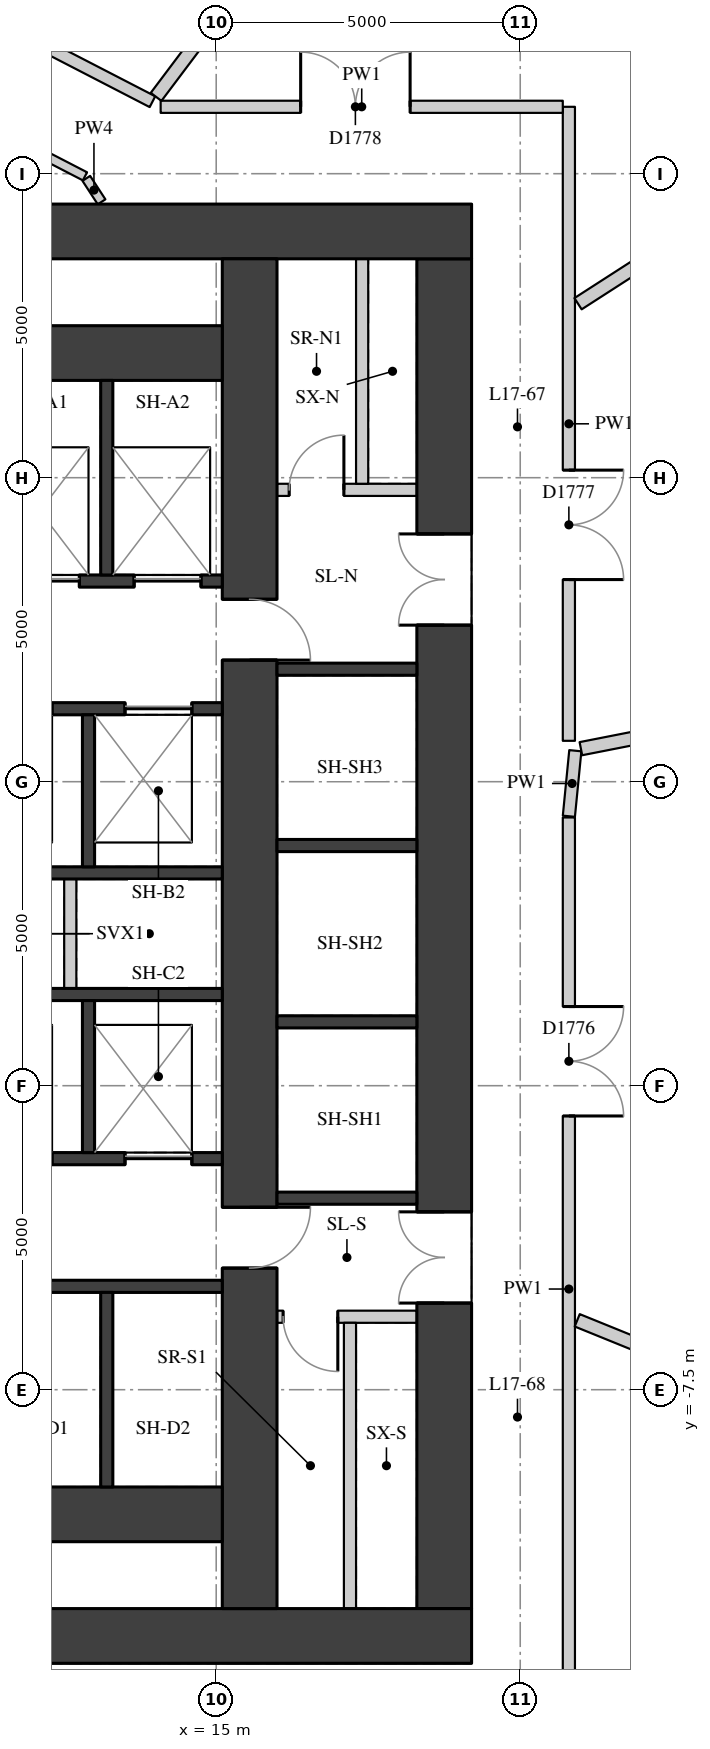
"""IFC4 building model, lengths in metres.
Left out: names, types, materials, properties, quantities, classifications, styles, units other than length and angle.
Written with IfcOpenShell. Run it as: python <this file> out.ifc"""

import sys

from ifc_helpers import new_model, si_unit, direction, frame, frame_2d, origin, place, context, subcontext, project, spatial, rectangle, extrude, element, fill, save


model = new_model("IFC4")
c1 = context("Model", 3, precision=1e-05, world=origin(), true_north=direction((0.0, 1.0)))
c2 = subcontext(c1, "Body", "Model", "MODEL_VIEW")
j1 = project(units=[si_unit("LENGTHUNIT", "METRE"), si_unit("PLANEANGLEUNIT", "RADIAN")], contexts=[c1])
p1 = place(None, origin())
s1 = spatial("IfcSite", under=j1, at=p1, CompositionType="ELEMENT")
p2 = place(p1, origin())
s2 = spatial("IfcBuilding", under=s1, at=p2, CompositionType="ELEMENT")
p3 = place(p2, frame((0.0, 0.0, 64.6)))
s3 = spatial("IfcBuildingStorey", under=s2, at=p3, CompositionType="ELEMENT", Elevation=64.6)
p4 = place(p3, frame((18.75, -11.1, 0.0), z_axis=(0.0, 0.0, 1.0), x_axis=(0.0, 1.0, 0.0)))
e1 = element("IfcWall", 1, at=p4, inside=s3, PredefinedType="SHEAR", context=c2, shape_type="SweptSolid", body=[
    extrude(rectangle(XDim=22.2, YDim=0.9, at=frame_2d((11.1, 0.0))), origin(), (0.0, 0.0, 1.0), 3.02),
])
p5 = place(p4, frame((16.175, 0.0, 0.0)))
e2 = element("IfcOpeningElement", 2, at=p5, cuts=e1, PredefinedType="OPENING", context=c2, shape_type="SweptSolid", body=[
    extrude(rectangle(XDim=1.5, YDim=2.1, at=frame_2d((0.75, 1.05))), frame((0.0, 0.46, 0.0), z_axis=(0.0, -1.0, 0.0), x_axis=(1.0, 0.0, 0.0)), (0.0, 0.0, 1.0), 0.92),
])
p6 = place(p4, frame((5.025, 0.0, 0.0)))
e3 = element("IfcOpeningElement", 3, at=p6, cuts=e1, PredefinedType="OPENING", context=c2, shape_type="SweptSolid", body=[
    extrude(rectangle(XDim=1.5, YDim=2.1, at=frame_2d((0.75, 1.05))), frame((0.0, 0.46, 0.0), z_axis=(0.0, -1.0, 0.0), x_axis=(1.0, 0.0, 0.0)), (0.0, 0.0, 1.0), 0.92),
])
for number, where, z_axis, x_axis in (
    (4, (4.0, 11.55, 0.0), (0.0, 0.0, 1.0), (1.0, 0.0, 0.0)),
    (5, (4.0, -11.55, 0.0), (0.0, 0.0, 1.0), (1.0, 0.0, 0.0)),
):
    element("IfcWall", number, at=place(p3, frame(where, z_axis=z_axis, x_axis=x_axis)), inside=s3, PredefinedType="SHEAR", context=c2, shape_type="SweptSolid", body=[
        extrude(rectangle(XDim=15.2, YDim=0.9, at=frame_2d((7.6, 0.0))), origin(), (0.0, 0.0, 1.0), 3.02),
    ])
p7 = place(p3, frame((15.55, -11.1, 0.0), z_axis=(0.0, 0.0, 1.0), x_axis=(0.0, 1.0, 0.0)))
e6 = element("IfcWall", 6, at=p7, inside=s3, PredefinedType="SHEAR", context=c2, shape_type="SweptSolid", body=[
    extrude(rectangle(XDim=22.2, YDim=0.9, at=frame_2d((11.1, 0.0))), origin(), (0.0, 0.0, 1.0), 3.02),
])
p8 = place(p7, frame((15.6, 0.0, 0.0)))
e7 = element("IfcOpeningElement", 7, at=p8, cuts=e6, PredefinedType="OPENING", context=c2, shape_type="SweptSolid", body=[
    extrude(rectangle(XDim=1.0, YDim=2.1, at=frame_2d((0.5, 1.05))), frame((0.0, 0.46, 0.0), z_axis=(0.0, -1.0, 0.0), x_axis=(1.0, 0.0, 0.0)), (0.0, 0.0, 1.0), 0.92),
])
p9 = place(p7, frame((5.6, 0.0, 0.0)))
e8 = element("IfcOpeningElement", 8, at=p9, cuts=e6, PredefinedType="OPENING", context=c2, shape_type="SweptSolid", body=[
    extrude(rectangle(XDim=1.0, YDim=2.1, at=frame_2d((0.5, 1.05))), frame((0.0, 0.46, 0.0), z_axis=(0.0, -1.0, 0.0), x_axis=(1.0, 0.0, 0.0)), (0.0, 0.0, 1.0), 0.92),
])
for number, where, z_axis, x_axis in (
    (9, (4.9, 9.55, 0.0), (0.0, 0.0, 1.0), (1.0, 0.0, 0.0)),
    (10, (4.9, -9.55, 0.0), (0.0, 0.0, 1.0), (1.0, 0.0, 0.0)),
):
    element("IfcWall", number, at=place(p3, frame(where, z_axis=z_axis, x_axis=x_axis)), inside=s3, PredefinedType="SHEAR", context=c2, shape_type="SweptSolid", body=[
        extrude(rectangle(XDim=10.2, YDim=0.9, at=frame_2d((5.1, 0.0))), origin(), (0.0, 0.0, 1.0), 3.02),
    ])
p10 = place(p3, frame((4.9, 5.8, 0.0), z_axis=(0.0, 0.0, 1.0), x_axis=(1.0, 0.0, 0.0)))
e11 = element("IfcWall", 11, at=p10, inside=s3, PredefinedType="SHEAR", context=c2, shape_type="SweptSolid", body=[
    extrude(rectangle(XDim=10.2, YDim=0.2, at=frame_2d((5.1, 0.0))), origin(), (0.0, 0.0, 1.0), 3.02),
])
p11 = place(p10, frame((6.75, 0.0, 0.0)))
e12 = element("IfcOpeningElement", 12, at=p11, cuts=e11, PredefinedType="OPENING", context=c2, shape_type="SweptSolid", body=[
    extrude(rectangle(XDim=1.1, YDim=2.1, at=frame_2d((0.55, 1.05))), frame((0.0, 0.11, 0.0), z_axis=(0.0, -1.0, 0.0), x_axis=(1.0, 0.0, 0.0)), (0.0, 0.0, 1.0), 0.22),
])
p12 = place(p10, frame((8.75, 0.0, 0.0)))
e13 = element("IfcOpeningElement", 13, at=p12, cuts=e11, PredefinedType="OPENING", context=c2, shape_type="SweptSolid", body=[
    extrude(rectangle(XDim=1.1, YDim=2.1, at=frame_2d((0.55, 1.05))), frame((0.0, 0.11, 0.0), z_axis=(0.0, -1.0, 0.0), x_axis=(1.0, 0.0, 0.0)), (0.0, 0.0, 1.0), 0.22),
])
p13 = place(p3, frame((4.9, 3.7, 0.0), z_axis=(0.0, 0.0, 1.0), x_axis=(1.0, 0.0, 0.0)))
e14 = element("IfcWall", 14, at=p13, inside=s3, PredefinedType="SHEAR", context=c2, shape_type="SweptSolid", body=[
    extrude(rectangle(XDim=10.2, YDim=0.2, at=frame_2d((5.1, 0.0))), origin(), (0.0, 0.0, 1.0), 3.02),
])
p14 = place(p13, frame((6.3, 0.0, 0.0)))
e15 = element("IfcOpeningElement", 15, at=p14, cuts=e14, PredefinedType="OPENING", context=c2, shape_type="SweptSolid", body=[
    extrude(rectangle(XDim=1.1, YDim=2.1, at=frame_2d((0.55, 1.05))), frame((0.0, 0.11, 0.0), z_axis=(0.0, -1.0, 0.0), x_axis=(1.0, 0.0, 0.0)), (0.0, 0.0, 1.0), 0.22),
])
p15 = place(p13, frame((8.6, 0.0, 0.0)))
e16 = element("IfcOpeningElement", 16, at=p15, cuts=e14, PredefinedType="OPENING", context=c2, shape_type="SweptSolid", body=[
    extrude(rectangle(XDim=1.1, YDim=2.1, at=frame_2d((0.55, 1.05))), frame((0.0, 0.11, 0.0), z_axis=(0.0, -1.0, 0.0), x_axis=(1.0, 0.0, 0.0)), (0.0, 0.0, 1.0), 0.22),
])
for number, where, z_axis, x_axis in (
    (17, (4.9, 1.0, 0.0), (0.0, 0.0, 1.0), (1.0, 0.0, 0.0)),
    (18, (4.9, -1.0, 0.0), (0.0, 0.0, 1.0), (1.0, 0.0, 0.0)),
):
    element("IfcWall", number, at=place(p3, frame(where, z_axis=z_axis, x_axis=x_axis)), inside=s3, PredefinedType="SHEAR", context=c2, shape_type="SweptSolid", body=[
        extrude(rectangle(XDim=10.2, YDim=0.2, at=frame_2d((5.1, 0.0))), origin(), (0.0, 0.0, 1.0), 3.02),
    ])
p16 = place(p3, frame((4.9, -3.7, 0.0), z_axis=(0.0, 0.0, 1.0), x_axis=(1.0, 0.0, 0.0)))
e19 = element("IfcWall", 19, at=p16, inside=s3, PredefinedType="SHEAR", context=c2, shape_type="SweptSolid", body=[
    extrude(rectangle(XDim=10.2, YDim=0.2, at=frame_2d((5.1, 0.0))), origin(), (0.0, 0.0, 1.0), 3.02),
])
p17 = place(p16, frame((6.3, 0.0, 0.0)))
e20 = element("IfcOpeningElement", 20, at=p17, cuts=e19, PredefinedType="OPENING", context=c2, shape_type="SweptSolid", body=[
    extrude(rectangle(XDim=1.1, YDim=2.1, at=frame_2d((0.55, 1.05))), frame((0.0, 0.11, 0.0), z_axis=(0.0, -1.0, 0.0), x_axis=(1.0, 0.0, 0.0)), (0.0, 0.0, 1.0), 0.22),
])
p18 = place(p16, frame((8.6, 0.0, 0.0)))
e21 = element("IfcOpeningElement", 21, at=p18, cuts=e19, PredefinedType="OPENING", context=c2, shape_type="SweptSolid", body=[
    extrude(rectangle(XDim=1.1, YDim=2.1, at=frame_2d((0.55, 1.05))), frame((0.0, 0.11, 0.0), z_axis=(0.0, -1.0, 0.0), x_axis=(1.0, 0.0, 0.0)), (0.0, 0.0, 1.0), 0.22),
])
p19 = place(p3, frame((4.9, -5.8, 0.0), z_axis=(0.0, 0.0, 1.0), x_axis=(1.0, 0.0, 0.0)))
e22 = element("IfcWall", 22, at=p19, inside=s3, PredefinedType="SHEAR", context=c2, shape_type="SweptSolid", body=[
    extrude(rectangle(XDim=10.2, YDim=0.2, at=frame_2d((5.1, 0.0))), origin(), (0.0, 0.0, 1.0), 3.02),
])
for number, where, z_axis, x_axis in (
    (23, (13.2, 5.9, 0.0), (0.0, 0.0, 1.0), (0.0, 1.0, 0.0)),
    (24, (13.2, -9.1, 0.0), (0.0, 0.0, 1.0), (0.0, 1.0, 0.0)),
):
    element("IfcWall", number, at=place(p3, frame(where, z_axis=z_axis, x_axis=x_axis)), inside=s3, PredefinedType="SHEAR", context=c2, shape_type="SweptSolid", body=[
        extrude(rectangle(XDim=3.2, YDim=0.2, at=frame_2d((1.6, 0.0))), origin(), (0.0, 0.0, 1.0), 3.02),
    ])
for number, where, z_axis, x_axis in (
    (25, (12.9, 1.1, 0.0), (0.0, 0.0, 1.0), (0.0, 1.0, 0.0)),
    (26, (12.9, -3.6, 0.0), (0.0, 0.0, 1.0), (0.0, 1.0, 0.0)),
):
    element("IfcWall", number, at=place(p3, frame(where, z_axis=z_axis, x_axis=x_axis)), inside=s3, PredefinedType="SHEAR", context=c2, shape_type="SweptSolid", body=[
        extrude(rectangle(XDim=2.5, YDim=0.2, at=frame_2d((1.25, 0.0))), origin(), (0.0, 0.0, 1.0), 3.02),
    ])
p20 = place(p3, frame((12.6, -0.9, 0.0), z_axis=(0.0, 0.0, 1.0), x_axis=(0.0, 1.0, 0.0)))
e27 = element("IfcWall", 27, at=p20, inside=s3, PredefinedType="PARTITIONING", context=c2, shape_type="SweptSolid", body=[
    extrude(rectangle(XDim=1.8, YDim=0.2, at=frame_2d((0.9, 0.0))), origin(), (0.0, 0.0, 1.0), 3.02),
])
for number, where, z_axis, x_axis in (
    (28, (16.0, -4.35, 0.0), (0.0, 0.0, 1.0), (1.0, 0.0, 0.0)),
    (29, (16.0, -1.45, 0.0), (0.0, 0.0, 1.0), (1.0, 0.0, 0.0)),
    (30, (16.0, 1.45, 0.0), (0.0, 0.0, 1.0), (1.0, 0.0, 0.0)),
    (31, (16.0, 4.35, 0.0), (0.0, 0.0, 1.0), (1.0, 0.0, 0.0)),
):
    element("IfcWall", number, at=place(p3, frame(where, z_axis=z_axis, x_axis=x_axis)), inside=s3, PredefinedType="SHEAR", context=c2, shape_type="SweptSolid", body=[
        extrude(rectangle(XDim=2.3, YDim=0.2, at=frame_2d((1.15, 0.0))), origin(), (0.0, 0.0, 1.0), 3.02),
    ])
p21 = place(p3, frame((16.0, 7.3, 0.0), z_axis=(0.0, 0.0, 1.0), x_axis=(1.0, 0.0, 0.0)))
e32 = element("IfcWall", 32, at=p21, inside=s3, PredefinedType="PARTITIONING", context=c2, shape_type="SweptSolid", body=[
    extrude(rectangle(XDim=2.3, YDim=0.2, at=frame_2d((1.15, 0.0))), origin(), (0.0, 0.0, 1.0), 3.02),
])
p22 = place(p21, frame((0.2, 0.0, 0.0)))
e33 = element("IfcOpeningElement", 33, at=p22, cuts=e32, PredefinedType="OPENING", context=c2, shape_type="SweptSolid", body=[
    extrude(rectangle(XDim=0.9, YDim=2.1, at=frame_2d((0.45, 1.05))), frame((0.0, 0.11, 0.0), z_axis=(0.0, -1.0, 0.0), x_axis=(1.0, 0.0, 0.0)), (0.0, 0.0, 1.0), 0.22),
])
p23 = place(p3, frame((17.4, 7.4, 0.0), z_axis=(0.0, 0.0, 1.0), x_axis=(0.0, 1.0, 0.0)))
e34 = element("IfcWall", 34, at=p23, inside=s3, PredefinedType="PARTITIONING", context=c2, shape_type="SweptSolid", body=[
    extrude(rectangle(XDim=3.7, YDim=0.2, at=frame_2d((1.85, 0.0))), origin(), (0.0, 0.0, 1.0), 3.02),
])
p24 = place(p3, frame((16.0, -6.3, 0.0), z_axis=(0.0, 0.0, 1.0), x_axis=(1.0, 0.0, 0.0)))
e35 = element("IfcWall", 35, at=p24, inside=s3, PredefinedType="PARTITIONING", context=c2, shape_type="SweptSolid", body=[
    extrude(rectangle(XDim=2.3, YDim=0.2, at=frame_2d((1.15, 0.0))), origin(), (0.0, 0.0, 1.0), 3.02),
])
p25 = place(p24, frame((0.1, 0.0, 0.0)))
e36 = element("IfcOpeningElement", 36, at=p25, cuts=e35, PredefinedType="OPENING", context=c2, shape_type="SweptSolid", body=[
    extrude(rectangle(XDim=0.9, YDim=2.1, at=frame_2d((0.45, 1.05))), frame((0.0, 0.11, 0.0), z_axis=(0.0, -1.0, 0.0), x_axis=(1.0, 0.0, 0.0)), (0.0, 0.0, 1.0), 0.22),
])
p26 = place(p3, frame((17.2, -11.1, 0.0), z_axis=(0.0, 0.0, 1.0), x_axis=(0.0, 1.0, 0.0)))
e37 = element("IfcWall", 37, at=p26, inside=s3, PredefinedType="PARTITIONING", context=c2, shape_type="SweptSolid", body=[
    extrude(rectangle(XDim=4.7, YDim=0.2, at=frame_2d((2.35, 0.0))), origin(), (0.0, 0.0, 1.0), 3.02),
])
p27 = place(p3, frame((20.8, 13.6, 0.0), z_axis=(0.0, 0.0, 1.0), x_axis=(0.0, -1.0, 0.0)))
e38 = element("IfcWall", 38, at=p27, inside=s3, PredefinedType="PARTITIONING", context=c2, shape_type="SweptSolid", body=[
    extrude(rectangle(XDim=10.428, YDim=0.2, at=frame_2d((5.214, 0.0))), origin(), (0.0, 0.0, 1.0), 3.02),
])
p28 = place(p27, frame((5.976, 0.0, 0.0)))
e39 = element("IfcOpeningElement", 39, at=p28, cuts=e38, PredefinedType="OPENING", context=c2, shape_type="SweptSolid", body=[
    extrude(rectangle(XDim=1.8, YDim=2.1, at=frame_2d((0.9, 1.05))), frame((0.0, 0.11, 0.0), z_axis=(0.0, -1.0, 0.0), x_axis=(1.0, 0.0, 0.0)), (0.0, 0.0, 1.0), 0.22),
])
p29 = place(p3, frame((20.906, 3.01, 0.0), z_axis=(0.0, 0.0, 1.0), x_axis=(-0.09782971129, -0.995203169001, 0.0)))
e40 = element("IfcWall", 40, at=p29, inside=s3, PredefinedType="PARTITIONING", context=c2, shape_type="SweptSolid", body=[
    extrude(rectangle(XDim=1.083, YDim=0.2, at=frame_2d((0.542, 0.0))), origin(), (0.0, 0.0, 1.0), 3.02),
])
p30 = place(p3, frame((20.8, 1.912, 0.0), z_axis=(0.0, 0.0, 1.0), x_axis=(0.0, -1.0, 0.0)))
e41 = element("IfcWall", 41, at=p30, inside=s3, PredefinedType="PARTITIONING", context=c2, shape_type="SweptSolid", body=[
    extrude(rectangle(XDim=15.512, YDim=0.2, at=frame_2d((7.756, 0.0))), origin(), (0.0, 0.0, 1.0), 3.02),
])
p31 = place(p30, frame((3.11, 0.0, 0.0)))
e42 = element("IfcOpeningElement", 42, at=p31, cuts=e41, PredefinedType="OPENING", context=c2, shape_type="SweptSolid", body=[
    extrude(rectangle(XDim=1.8, YDim=2.1, at=frame_2d((0.9, 1.05))), frame((0.0, 0.11, 0.0), z_axis=(0.0, -1.0, 0.0), x_axis=(1.0, 0.0, 0.0)), (0.0, 0.0, 1.0), 0.22),
])
p32 = place(p3, frame((7.606, 16.961, 0.0), z_axis=(0.0, 0.0, 1.0), x_axis=(0.888519518851, -0.45883882205, 0.0)))
e43 = element("IfcWall", 43, at=p32, inside=s3, PredefinedType="PARTITIONING", context=c2, shape_type="SweptSolid", body=[
    extrude(rectangle(XDim=7.142, YDim=0.2, at=frame_2d((3.571, 0.0))), origin(), (0.0, 0.0, 1.0), 3.02),
])
p33 = place(p32, frame((3.342, 0.0, 0.0)))
e44 = element("IfcOpeningElement", 44, at=p33, cuts=e43, PredefinedType="OPENING", context=c2, shape_type="SweptSolid", body=[
    extrude(rectangle(XDim=1.1, YDim=2.1, at=frame_2d((0.55, 1.05))), frame((0.0, 0.11, 0.0), z_axis=(0.0, -1.0, 0.0), x_axis=(1.0, 0.0, 0.0)), (0.0, 0.0, 1.0), 0.22),
])
p34 = place(p3, frame((14.086, 13.6, 0.0), z_axis=(0.0, 0.0, 1.0), x_axis=(1.0, 0.0, 0.0)))
e45 = element("IfcWall", 45, at=p34, inside=s3, PredefinedType="PARTITIONING", context=c2, shape_type="SweptSolid", body=[
    extrude(rectangle(XDim=6.614, YDim=0.2, at=frame_2d((3.307, 0.0))), origin(), (0.0, 0.0, 1.0), 3.02),
])
p35 = place(p34, frame((2.303, 0.0, 0.0)))
e46 = element("IfcOpeningElement", 46, at=p35, cuts=e45, PredefinedType="OPENING", context=c2, shape_type="SweptSolid", body=[
    extrude(rectangle(XDim=1.8, YDim=2.1, at=frame_2d((0.9, 1.05))), frame((0.0, 0.11, 0.0), z_axis=(0.0, -1.0, 0.0), x_axis=(1.0, 0.0, 0.0)), (0.0, 0.0, 1.0), 0.22),
])
p36 = place(p3, frame((7.012, 15.467, 0.0), z_axis=(0.0, 0.0, 1.0), x_axis=(0.888509096081, -0.458859004685, 0.0)))
e47 = element("IfcWall", 47, at=p36, inside=s3, PredefinedType="PARTITIONING", context=c2, shape_type="SweptSolid", body=[
    extrude(rectangle(XDim=6.561, YDim=0.15, at=frame_2d((3.281, 0.0))), origin(), (0.0, 0.0, 1.0), 3.02),
])
p37 = place(p3, frame((12.864, 12.423, 0.0), z_axis=(0.0, 0.0, 1.0), x_axis=(0.545733799108, -0.837958603101, 0.0)))
e48 = element("IfcWall", 48, at=p37, inside=s3, PredefinedType="PARTITIONING", context=c2, shape_type="SweptSolid", body=[
    extrude(rectangle(XDim=0.46, YDim=0.15, at=frame_2d((0.23, 0.0))), origin(), (0.0, 0.0, 1.0), 3.02),
])
p38 = place(p3, frame((27.085, 4.24, 0.0), z_axis=(0.0, 0.0, 1.0), x_axis=(-0.981208260902, -0.192951674616, 0.0)))
e49 = element("IfcWall", 49, at=p38, inside=s3, PredefinedType="PARTITIONING", context=c2, shape_type="SweptSolid", body=[
    extrude(rectangle(XDim=6.204, YDim=0.22, at=frame_2d((3.102, 0.0))), origin(), (0.0, 0.0, 1.0), 2.47),
])
p39 = place(p3, frame((23.835, 12.219, 0.0), z_axis=(0.0, 0.0, 1.0), x_axis=(-0.840694872373, -0.541509124176, 0.0)))
e50 = element("IfcWall", 50, at=p39, inside=s3, PredefinedType="PARTITIONING", context=c2, shape_type="SweptSolid", body=[
    extrude(rectangle(XDim=3.43, YDim=0.22, at=frame_2d((1.715, 0.0))), origin(), (0.0, 0.0, 1.0), 3.02),
])
p40 = place(p3, frame((16.927, 17.638, 0.0), z_axis=(0.0, 0.0, 1.0), x_axis=(-0.601159395391, -0.799129139334, 0.0)))
e51 = element("IfcWall", 51, at=p40, inside=s3, PredefinedType="PARTITIONING", context=c2, shape_type="SweptSolid", body=[
    extrude(rectangle(XDim=4.849, YDim=0.22, at=frame_2d((2.425, 0.0))), origin(), (0.0, 0.0, 1.0), 3.02),
])
p41 = place(p3, frame((25.851, -8.354, 0.0), z_axis=(0.0, 0.0, 1.0), x_axis=(-0.926546814299, 0.376179479653, 0.0)))
e52 = element("IfcWall", 52, at=p41, inside=s3, PredefinedType="PARTITIONING", context=c2, shape_type="SweptSolid", body=[
    extrude(rectangle(XDim=5.304, YDim=0.22, at=frame_2d((2.652, 0.0))), origin(), (0.0, 0.0, 1.0), 3.02),
])
p42 = place(p5, origin())
e53 = element("IfcDoor", 53, at=p42, inside=s3, OperationType="DOUBLE_DOOR_SINGLE_SWING", PredefinedType="DOOR", context=c2, shape_type="SweptSolid", body=[
    extrude(rectangle(XDim=1.5, YDim=2.1, at=frame_2d((0.75, 1.05))), frame((0.0, 0.025, 0.0), z_axis=(0.0, -1.0, 0.0), x_axis=(1.0, 0.0, 0.0)), (0.0, 0.0, 1.0), 0.05),
])
fill(e2, e53)
p43 = place(p6, origin())
e54 = element("IfcDoor", 54, at=p43, inside=s3, OperationType="DOUBLE_DOOR_SINGLE_SWING", PredefinedType="DOOR", context=c2, shape_type="SweptSolid", body=[
    extrude(rectangle(XDim=1.5, YDim=2.1, at=frame_2d((0.75, 1.05))), frame((0.0, 0.025, 0.0), z_axis=(0.0, -1.0, 0.0), x_axis=(1.0, 0.0, 0.0)), (0.0, 0.0, 1.0), 0.05),
])
fill(e3, e54)
p44 = place(p11, origin())
e55 = element("IfcDoor", 55, at=p44, inside=s3, OperationType="DOUBLE_DOOR_SLIDING", PredefinedType="DOOR", context=c2, shape_type="SweptSolid", body=[
    extrude(rectangle(XDim=1.1, YDim=2.1, at=frame_2d((0.55, 1.05))), frame((0.0, 0.025, 0.0), z_axis=(0.0, -1.0, 0.0), x_axis=(1.0, 0.0, 0.0)), (0.0, 0.0, 1.0), 0.05),
])
fill(e12, e55)
p45 = place(p12, origin())
e56 = element("IfcDoor", 56, at=p45, inside=s3, OperationType="DOUBLE_DOOR_SLIDING", PredefinedType="DOOR", context=c2, shape_type="SweptSolid", body=[
    extrude(rectangle(XDim=1.1, YDim=2.1, at=frame_2d((0.55, 1.05))), frame((0.0, 0.025, 0.0), z_axis=(0.0, -1.0, 0.0), x_axis=(1.0, 0.0, 0.0)), (0.0, 0.0, 1.0), 0.05),
])
fill(e13, e56)
p46 = place(p15, origin())
e57 = element("IfcDoor", 57, at=p46, inside=s3, OperationType="DOUBLE_DOOR_SLIDING", PredefinedType="DOOR", context=c2, shape_type="SweptSolid", body=[
    extrude(rectangle(XDim=1.1, YDim=2.1, at=frame_2d((0.55, 1.05))), frame((0.0, 0.025, 0.0), z_axis=(0.0, -1.0, 0.0), x_axis=(1.0, 0.0, 0.0)), (0.0, 0.0, 1.0), 0.05),
])
fill(e16, e57)
p47 = place(p18, origin())
e58 = element("IfcDoor", 58, at=p47, inside=s3, OperationType="DOUBLE_DOOR_SLIDING", PredefinedType="DOOR", context=c2, shape_type="SweptSolid", body=[
    extrude(rectangle(XDim=1.1, YDim=2.1, at=frame_2d((0.55, 1.05))), frame((0.0, 0.025, 0.0), z_axis=(0.0, -1.0, 0.0), x_axis=(1.0, 0.0, 0.0)), (0.0, 0.0, 1.0), 0.05),
])
fill(e21, e58)
p48 = place(p8, origin())
e59 = element("IfcDoor", 59, at=p48, inside=s3, OperationType="SINGLE_SWING_RIGHT", PredefinedType="DOOR", context=c2, shape_type="SweptSolid", body=[
    extrude(rectangle(XDim=1.0, YDim=2.1, at=frame_2d((0.5, 1.05))), frame((0.0, 0.025, 0.0), z_axis=(0.0, -1.0, 0.0), x_axis=(1.0, 0.0, 0.0)), (0.0, 0.0, 1.0), 0.05),
])
fill(e7, e59)
p49 = place(p22, origin())
e60 = element("IfcDoor", 60, at=p49, inside=s3, OperationType="SINGLE_SWING_RIGHT", PredefinedType="DOOR", context=c2, shape_type="SweptSolid", body=[
    extrude(rectangle(XDim=0.9, YDim=2.1, at=frame_2d((0.45, 1.05))), frame((0.0, 0.025, 0.0), z_axis=(0.0, -1.0, 0.0), x_axis=(1.0, 0.0, 0.0)), (0.0, 0.0, 1.0), 0.05),
])
fill(e33, e60)
p50 = place(p9, origin())
e61 = element("IfcDoor", 61, at=p50, inside=s3, OperationType="SINGLE_SWING_LEFT", PredefinedType="DOOR", context=c2, shape_type="SweptSolid", body=[
    extrude(rectangle(XDim=1.0, YDim=2.1, at=frame_2d((0.5, 1.05))), frame((0.0, 0.025, 0.0), z_axis=(0.0, -1.0, 0.0), x_axis=(1.0, 0.0, 0.0)), (0.0, 0.0, 1.0), 0.05),
])
fill(e8, e61)
p51 = place(p25, origin())
e62 = element("IfcDoor", 62, at=p51, inside=s3, OperationType="SINGLE_SWING_LEFT", PredefinedType="DOOR", context=c2, shape_type="SweptSolid", body=[
    extrude(rectangle(XDim=0.9, YDim=2.1, at=frame_2d((0.45, 1.05))), frame((0.0, 0.025, 0.0), z_axis=(0.0, -1.0, 0.0), x_axis=(1.0, 0.0, 0.0)), (0.0, 0.0, 1.0), 0.05),
])
fill(e36, e62)
p52 = place(p31, origin())
e63 = element("IfcDoor", 63, at=p52, inside=s3, OperationType="DOUBLE_DOOR_SINGLE_SWING", PredefinedType="DOOR", context=c2, shape_type="SweptSolid", body=[
    extrude(rectangle(XDim=1.8, YDim=2.1, at=frame_2d((0.9, 1.05))), frame((0.0, 0.025, 0.0), z_axis=(0.0, -1.0, 0.0), x_axis=(1.0, 0.0, 0.0)), (0.0, 0.0, 1.0), 0.05),
])
fill(e42, e63)
p53 = place(p28, origin())
e64 = element("IfcDoor", 64, at=p53, inside=s3, OperationType="DOUBLE_DOOR_SINGLE_SWING", PredefinedType="DOOR", context=c2, shape_type="SweptSolid", body=[
    extrude(rectangle(XDim=1.8, YDim=2.1, at=frame_2d((0.9, 1.05))), frame((0.0, 0.025, 0.0), z_axis=(0.0, -1.0, 0.0), x_axis=(1.0, 0.0, 0.0)), (0.0, 0.0, 1.0), 0.05),
])
fill(e39, e64)
p54 = place(p35, origin())
e65 = element("IfcDoor", 65, at=p54, inside=s3, OperationType="DOUBLE_DOOR_SINGLE_SWING", PredefinedType="DOOR", context=c2, shape_type="SweptSolid", body=[
    extrude(rectangle(XDim=1.8, YDim=2.1, at=frame_2d((0.9, 1.05))), frame((0.0, 0.025, 0.0), z_axis=(0.0, -1.0, 0.0), x_axis=(1.0, 0.0, 0.0)), (0.0, 0.0, 1.0), 0.05),
])
fill(e46, e65)
save(model, sys.argv[1])
